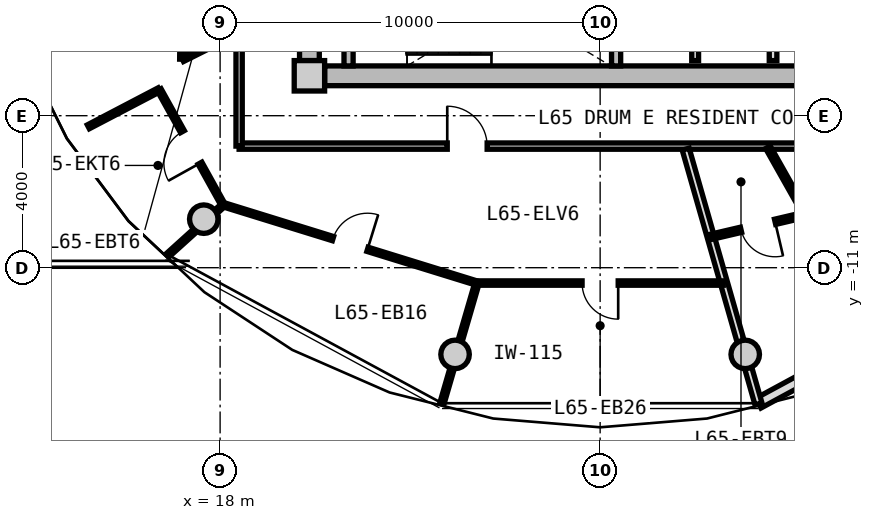
"""IFC4 building model, lengths in metres.
Left out: names, types, materials, properties, quantities, classifications, styles, units other than length and angle.
Written with IfcOpenShell. Run it as: python <this file> out.ifc"""

import sys

from ifc_helpers import new_model, si_unit, direction, frame, frame_2d, origin, origin_2d, place, context, subcontext, project, spatial, rectangle, circle, extrude, source, transform, mapped, element, fill, save


model = new_model("IFC4")
c1 = context("Model", 3, precision=1e-05, world=origin(), true_north=direction((0.0, 1.0)))
c2 = subcontext(c1, "Body", "Model", "MODEL_VIEW")
j1 = project(units=[si_unit("LENGTHUNIT", "METRE"), si_unit("PLANEANGLEUNIT", "RADIAN")], contexts=[c1])
p1 = place(None, origin())
s1 = spatial("IfcSite", under=j1, at=p1, CompositionType="ELEMENT")
p2 = place(p1, origin())
s2 = spatial("IfcBuilding", under=s1, at=p2, CompositionType="ELEMENT")
p3 = place(p2, frame((0.0, 0.0, 210.85)))
s3 = spatial("IfcBuildingStorey", under=s2, at=p3, CompositionType="ELEMENT", Elevation=210.85)
m1 = source(origin(), c2, "Body", "SweptSolid", [
    extrude(rectangle(XDim=0.8, YDim=0.8, at=origin_2d()), origin(), (0.0, 0.0, 1.0), 3.05),
])
p4 = place(p3, frame((20.35, -5.95, 0.0), z_axis=(0.0, 0.0, 1.0), x_axis=(1.0, 0.0, 0.0)))
e1 = element("IfcColumn", 1, at=p4, inside=s3, PredefinedType="COLUMN", context=c2, shape_type="MappedRepresentation", body=[
    mapped(m1, transform((0.0, 0.0, 0.0), x_axis=(1.0, 0.0, 0.0), y_axis=(0.0, 1.0, 0.0), z_axis=(0.0, 0.0, 1.0), scale=1.0)),
])
m2 = source(origin(), c2, "Body", "SweptSolid", [
    extrude(rectangle(XDim=14.5, YDim=0.52, at=frame_2d((7.25, 0.0))), origin(), (0.0, 0.0, 1.0), 2.76),
])
p5 = place(p3, frame((35.25, -5.95, 0.0), z_axis=(0.0, 0.0, 1.0), x_axis=(-1.0, 0.0, 0.0)))
e2 = element("IfcWall", 2, at=p5, inside=s3, PredefinedType="SHEAR", context=c2, shape_type="MappedRepresentation", body=[
    mapped(m2, transform((0.0, 0.0, 0.0), x_axis=(1.0, 0.0, 0.0), y_axis=(0.0, 1.0, 0.0), z_axis=(0.0, 0.0, 1.0), scale=1.0)),
])
m3 = source(origin(), c2, "Body", "SweptSolid", [
    extrude(rectangle(XDim=11.1, YDim=0.52, at=frame_2d((5.55, 0.0))), origin(), (0.0, 0.0, 1.0), 2.76),
])
p6 = place(p3, frame((20.35, -5.55, 0.0), z_axis=(0.0, 0.0, 1.0), x_axis=(0.0, 1.0, 0.0)))
e3 = element("IfcWall", 3, at=p6, inside=s3, PredefinedType="SHEAR", context=c2, shape_type="MappedRepresentation", body=[
    mapped(m3, transform((0.0, 0.0, 0.0), x_axis=(1.0, 0.0, 0.0), y_axis=(0.0, 1.0, 0.0), z_axis=(0.0, 0.0, 1.0), scale=1.0)),
])
p7 = place(p6, frame((3.8, 0.0, 0.0)))
e4 = element("IfcOpeningElement", 4, at=p7, cuts=e3, PredefinedType="OPENING", context=c2, shape_type="SweptSolid", body=[
    extrude(rectangle(XDim=1.2, YDim=2.15, at=frame_2d((0.6, 1.075))), frame((0.0, 0.27, 0.0), z_axis=(0.0, -1.0, 0.0), x_axis=(1.0, 0.0, 0.0)), (0.0, 0.0, 1.0), 0.54),
])
m4 = source(origin(), c2, "Body", "SweptSolid", [
    extrude(circle(Radius=0.375, at=origin_2d()), origin(), (0.0, 0.0, 1.0), 3.05),
])
for number, where, z_axis, x_axis in (
    (5, (17.57, -9.723, 0.0), (0.0, 0.0, 1.0), (1.0, 0.0, 0.0)),
    (6, (24.182, -13.281, 0.0), (0.0, 0.0, 1.0), (1.0, 0.0, 0.0)),
    (7, (31.818, -13.281, 0.0), (0.0, 0.0, 1.0), (1.0, 0.0, 0.0)),
):
    element("IfcColumn", number, at=place(p3, frame(where, z_axis=z_axis, x_axis=x_axis)), inside=s3, PredefinedType="COLUMN", context=c2, shape_type="MappedRepresentation", body=[
        mapped(m4, transform((0.0, 0.0, 0.0), x_axis=(1.0, 0.0, 0.0), y_axis=(0.0, 1.0, 0.0), z_axis=(0.0, 0.0, 1.0), scale=1.0)),
    ])
m5 = source(origin(), c2, "Body", "SweptSolid", [
    extrude(rectangle(XDim=8.197, YDim=0.29, at=frame_2d((4.099, 0.0))), origin(), (0.0, 0.0, 1.0), 2.76),
])
p8 = place(p3, frame((39.37, -10.663, 0.0), z_axis=(0.0, 0.0, 1.0), x_axis=(-0.879369910001, -0.476139224791, 0.0)))
e8 = element("IfcWall", 8, at=p8, inside=s3, PredefinedType="SOLIDWALL", context=c2, shape_type="MappedRepresentation", body=[
    mapped(m5, transform((0.0, 0.0, 0.0), x_axis=(1.0, 0.0, 0.0), y_axis=(0.0, 1.0, 0.0), z_axis=(0.0, 0.0, 1.0), scale=1.0)),
])
p9 = place(p8, frame((0.98, 0.0, 0.0)))
e9 = element("IfcOpeningElement", 9, at=p9, cuts=e8, PredefinedType="OPENING", context=c2, shape_type="SweptSolid", body=[
    extrude(rectangle(XDim=1.15, YDim=2.25, at=frame_2d((0.575, 1.125))), frame((0.0, 0.155, 0.0), z_axis=(0.0, -1.0, 0.0), x_axis=(1.0, 0.0, 0.0)), (0.0, 0.0, 1.0), 0.31),
])
p10 = place(p8, frame((4.629, 0.0, 0.85)))
e10 = element("IfcOpeningElement", 10, at=p10, cuts=e8, PredefinedType="OPENING", context=c2, shape_type="SweptSolid", body=[
    extrude(rectangle(XDim=1.2, YDim=1.5, at=frame_2d((0.6, 0.75))), frame((0.0, 0.155, 0.0), z_axis=(0.0, -1.0, 0.0), x_axis=(1.0, 0.0, 0.0)), (0.0, 0.0, 1.0), 0.31),
])
m6 = source(origin(), c2, "Body", "SweptSolid", [
    extrude(rectangle(XDim=3.24, YDim=0.24, at=frame_2d((1.62, 0.0))), origin(), (0.0, 0.0, 1.0), 2.76),
])
for number, where, z_axis, x_axis in (
    (11, (21.38, -5.69, 0.0), (0.0, 0.0, 1.0), (0.0, 1.0, 0.0)),
    (12, (28.42, -5.69, 0.0), (0.0, 0.0, 1.0), (0.0, 1.0, 0.0)),
):
    element("IfcWall", number, at=place(p3, frame(where, z_axis=z_axis, x_axis=x_axis)), inside=s3, PredefinedType="PARTITIONING", context=c2, shape_type="MappedRepresentation", body=[
        mapped(m6, transform((0.0, 0.0, 0.0), x_axis=(1.0, 0.0, 0.0), y_axis=(0.0, 1.0, 0.0), z_axis=(0.0, 0.0, 1.0), scale=1.0)),
    ])
m7 = source(origin(), c2, "Body", "SweptSolid", [
    extrude(rectangle(XDim=3.8, YDim=0.2, at=frame_2d((1.9, 0.0))), origin(), (0.0, 0.0, 1.0), 2.745),
])
p11 = place(p3, frame((32.55, -5.55, 0.0), z_axis=(0.0, 0.0, 1.0), x_axis=(0.0, 1.0, 0.0)))
e13 = element("IfcWall", 13, at=p11, inside=s3, PredefinedType="PARTITIONING", context=c2, shape_type="MappedRepresentation", body=[
    mapped(m7, transform((0.0, 0.0, 0.0), x_axis=(1.0, 0.0, 0.0), y_axis=(0.0, 1.0, 0.0), z_axis=(0.0, 0.0, 1.0), scale=1.0)),
])
m8 = source(origin(), c2, "Body", "SweptSolid", [
    extrude(rectangle(XDim=4.2, YDim=0.18, at=frame_2d((2.1, 0.0))), origin(), (0.0, 0.0, 1.0), 2.745),
])
p12 = place(p3, frame((30.5, -5.55, 0.0), z_axis=(0.0, 0.0, 1.0), x_axis=(0.0, 1.0, 0.0)))
e14 = element("IfcWall", 14, at=p12, inside=s3, PredefinedType="PARTITIONING", context=c2, shape_type="MappedRepresentation", body=[
    mapped(m8, transform((0.0, 0.0, 0.0), x_axis=(1.0, 0.0, 0.0), y_axis=(0.0, 1.0, 0.0), z_axis=(0.0, 0.0, 1.0), scale=1.0)),
])
m9 = source(origin(), c2, "Body", "SweptSolid", [
    extrude(rectangle(XDim=19.0, YDim=0.165, at=frame_2d((9.5, 0.0))), origin(), (0.0, 0.0, 1.0), 2.745),
])
p13 = place(p3, frame((37.5, -7.8, 0.0), z_axis=(0.0, 0.0, 1.0), x_axis=(-1.0, 0.0, 0.0)))
e15 = element("IfcWall", 15, at=p13, inside=s3, PredefinedType="PARTITIONING", context=c2, shape_type="MappedRepresentation", body=[
    mapped(m9, transform((0.0, 0.0, 0.0), x_axis=(1.0, 0.0, 0.0), y_axis=(0.0, 1.0, 0.0), z_axis=(0.0, 0.0, 1.0), scale=1.0)),
])
p14 = place(p13, frame((12.473, 0.0, 0.0)))
e16 = element("IfcOpeningElement", 16, at=p14, cuts=e15, PredefinedType="OPENING", context=c2, shape_type="SweptSolid", body=[
    extrude(rectangle(XDim=1.05, YDim=2.15, at=frame_2d((0.525, 1.075))), frame((0.0, 0.093, 0.0), z_axis=(0.0, -1.0, 0.0), x_axis=(1.0, 0.0, 0.0)), (0.0, 0.0, 1.0), 0.185),
])
m10 = source(origin(), c2, "Body", "SweptSolid", [
    extrude(rectangle(XDim=6.88, YDim=0.165, at=frame_2d((3.44, 0.0))), origin(), (0.0, 0.0, 1.0), 2.745),
])
p15 = place(p3, frame((18.5, -7.8, 0.0), z_axis=(0.0, 0.0, 1.0), x_axis=(0.0, 1.0, 0.0)))
e17 = element("IfcWall", 17, at=p15, inside=s3, PredefinedType="PARTITIONING", context=c2, shape_type="MappedRepresentation", body=[
    mapped(m10, transform((0.0, 0.0, 0.0), x_axis=(1.0, 0.0, 0.0), y_axis=(0.0, 1.0, 0.0), z_axis=(0.0, 0.0, 1.0), scale=1.0)),
])
m11 = source(origin(), c2, "Body", "SweptSolid", [
    extrude(rectangle(XDim=6.974, YDim=0.19, at=frame_2d((3.487, 0.0))), origin(), (0.0, 0.0, 1.0), 2.345),
])
p16 = place(p3, frame((30.251, -7.88, 0.0), z_axis=(0.0, 0.0, 1.0), x_axis=(0.274707256801, -0.961527910703, 0.0)))
e18 = element("IfcWall", 18, at=p16, inside=s3, PredefinedType="PARTITIONING", context=c2, shape_type="MappedRepresentation", body=[
    mapped(m11, transform((0.0, 0.0, 0.0), x_axis=(1.0, 0.0, 0.0), y_axis=(0.0, 1.0, 0.0), z_axis=(0.0, 0.0, 1.0), scale=1.0)),
])
m12 = source(origin(), c2, "Body", "SweptSolid", [
    extrude(rectangle(XDim=6.98, YDim=0.115, at=frame_2d((3.49, 0.0))), origin(), (0.0, 0.0, 1.0), 2.745),
])
p17 = place(p3, frame((18.091, -9.344, 0.0), z_axis=(0.0, 0.0, 1.0), x_axis=(0.955342331637, -0.295501318749, 0.0)))
e19 = element("IfcWall", 19, at=p17, inside=s3, PredefinedType="PARTITIONING", context=c2, shape_type="MappedRepresentation", body=[
    mapped(m12, transform((0.0, 0.0, 0.0), x_axis=(1.0, 0.0, 0.0), y_axis=(0.0, 1.0, 0.0), z_axis=(0.0, 0.0, 1.0), scale=1.0)),
])
p18 = place(p17, frame((3.015, 0.0, 0.0)))
e20 = element("IfcOpeningElement", 20, at=p18, cuts=e19, PredefinedType="OPENING", context=c2, shape_type="SweptSolid", body=[
    extrude(rectangle(XDim=0.95, YDim=2.1, at=frame_2d((0.475, 1.05))), frame((0.0, 0.067, 0.0), z_axis=(0.0, -1.0, 0.0), x_axis=(1.0, 0.0, 0.0)), (0.0, 0.0, 1.0), 0.135),
])
m13 = source(origin(), c2, "Body", "SweptSolid", [
    extrude(rectangle(XDim=1.988, YDim=0.115, at=frame_2d((0.994, 0.0))), origin(), (0.0, 0.0, 1.0), 2.345),
])
p19 = place(p3, frame((18.091, -9.344, 0.0), z_axis=(0.0, 0.0, 1.0), x_axis=(-0.741992301729, -0.670408401033, 0.0)))
e21 = element("IfcWall", 21, at=p19, inside=s3, PredefinedType="PARTITIONING", context=c2, shape_type="MappedRepresentation", body=[
    mapped(m13, transform((0.0, 0.0, 0.0), x_axis=(1.0, 0.0, 0.0), y_axis=(0.0, 1.0, 0.0), z_axis=(0.0, 0.0, 1.0), scale=1.0)),
])
m14 = source(origin(), c2, "Body", "SweptSolid", [
    extrude(rectangle(XDim=6.481, YDim=0.115, at=frame_2d((3.24, 0.0))), origin(), (0.0, 0.0, 1.0), 2.745),
])
p20 = place(p3, frame((24.76, -11.404, 0.0), z_axis=(0.0, 0.0, 1.0), x_axis=(1.0, 0.0, 0.0)))
e22 = element("IfcWall", 22, at=p20, inside=s3, PredefinedType="PARTITIONING", context=c2, shape_type="MappedRepresentation", body=[
    mapped(m14, transform((0.0, 0.0, 0.0), x_axis=(1.0, 0.0, 0.0), y_axis=(0.0, 1.0, 0.0), z_axis=(0.0, 0.0, 1.0), scale=1.0)),
])
p21 = place(p20, frame((2.765, 0.0, 0.0)))
e23 = element("IfcOpeningElement", 23, at=p21, cuts=e22, PredefinedType="OPENING", context=c2, shape_type="SweptSolid", body=[
    extrude(rectangle(XDim=0.95, YDim=2.1, at=frame_2d((0.475, 1.05))), frame((0.0, 0.067, 0.0), z_axis=(0.0, -1.0, 0.0), x_axis=(1.0, 0.0, 0.0)), (0.0, 0.0, 1.0), 0.135),
])
m15 = source(origin(), c2, "Body", "SweptSolid", [
    extrude(rectangle(XDim=3.313, YDim=0.115, at=frame_2d((1.657, 0.0))), origin(), (0.0, 0.0, 1.0), 2.345),
])
p22 = place(p3, frame((24.76, -11.404, 0.0), z_axis=(0.0, 0.0, 1.0), x_axis=(-0.279612365916, -0.960112975033, 0.0)))
e24 = element("IfcWall", 24, at=p22, inside=s3, PredefinedType="PARTITIONING", context=c2, shape_type="MappedRepresentation", body=[
    mapped(m15, transform((0.0, 0.0, 0.0), x_axis=(1.0, 0.0, 0.0), y_axis=(0.0, 1.0, 0.0), z_axis=(0.0, 0.0, 1.0), scale=1.0)),
])
m16 = source(origin(), c2, "Body", "SweptSolid", [
    extrude(rectangle(XDim=1.638, YDim=0.14, at=frame_2d((0.819, 0.0))), origin(), (0.0, 0.0, 1.0), 2.745),
])
p23 = place(p3, frame((18.47, -4.778, 0.0), z_axis=(0.0, 0.0, 1.0), x_axis=(-0.893919977945, -0.448226586707, 0.0)))
e25 = element("IfcWall", 25, at=p23, inside=s3, PredefinedType="PARTITIONING", context=c2, shape_type="MappedRepresentation", body=[
    mapped(m16, transform((0.0, 0.0, 0.0), x_axis=(1.0, 0.0, 0.0), y_axis=(0.0, 1.0, 0.0), z_axis=(0.0, 0.0, 1.0), scale=1.0)),
])
m17 = source(origin(), c2, "Body", "SweptSolid", [
    extrude(rectangle(XDim=2.759, YDim=0.14, at=frame_2d((1.379, 0.0))), origin(), (0.0, 0.0, 1.0), 2.745),
])
p24 = place(p3, frame((17.005, -5.513, 0.0), z_axis=(0.0, 0.0, 1.0), x_axis=(0.01194710728, 0.999928630767, 0.0)))
e26 = element("IfcWall", 26, at=p24, inside=s3, PredefinedType="PARTITIONING", context=c2, shape_type="MappedRepresentation", body=[
    mapped(m17, transform((0.0, 0.0, 0.0), x_axis=(1.0, 0.0, 0.0), y_axis=(0.0, 1.0, 0.0), z_axis=(0.0, 0.0, 1.0), scale=1.0)),
])
p25 = place(p24, frame((0.919, 0.0, 0.0)))
e27 = element("IfcOpeningElement", 27, at=p25, cuts=e26, PredefinedType="OPENING", context=c2, shape_type="SweptSolid", body=[
    extrude(rectangle(XDim=0.92, YDim=2.1, at=frame_2d((0.46, 1.05))), frame((0.0, 0.08, 0.0), z_axis=(0.0, -1.0, 0.0), x_axis=(1.0, 0.0, 0.0)), (0.0, 0.0, 1.0), 0.16),
])
m18 = source(origin(), c2, "Body", "SweptSolid", [
    extrude(rectangle(XDim=2.104, YDim=0.115, at=frame_2d((1.052, 0.0))), origin(), (0.0, 0.0, 1.0), 2.745),
])
p26 = place(p3, frame((16.396, -6.317, 0.0), z_axis=(0.0, 0.0, 1.0), x_axis=(-0.886060817493, -0.463569010724, 0.0)))
e28 = element("IfcWall", 28, at=p26, inside=s3, PredefinedType="PARTITIONING", context=c2, shape_type="MappedRepresentation", body=[
    mapped(m18, transform((0.0, 0.0, 0.0), x_axis=(1.0, 0.0, 0.0), y_axis=(0.0, 1.0, 0.0), z_axis=(0.0, 0.0, 1.0), scale=1.0)),
])
m19 = source(origin(), c2, "Body", "SweptSolid", [
    extrude(rectangle(XDim=3.472, YDim=0.115, at=frame_2d((1.736, 0.0))), origin(), (0.0, 0.0, 1.0), 2.745),
])
p27 = place(p3, frame((16.396, -6.317, 0.0), z_axis=(0.0, 0.0, 1.0), x_axis=(0.485804139346, -0.874067696574, 0.0)))
e29 = element("IfcWall", 29, at=p27, inside=s3, PredefinedType="PARTITIONING", context=c2, shape_type="MappedRepresentation", body=[
    mapped(m19, transform((0.0, 0.0, 0.0), x_axis=(1.0, 0.0, 0.0), y_axis=(0.0, 1.0, 0.0), z_axis=(0.0, 0.0, 1.0), scale=1.0)),
])
p28 = place(p27, frame((1.261, 0.0, 0.0)))
e30 = element("IfcOpeningElement", 30, at=p28, cuts=e29, PredefinedType="OPENING", context=c2, shape_type="SweptSolid", body=[
    extrude(rectangle(XDim=0.95, YDim=2.1, at=frame_2d((0.475, 1.05))), frame((0.0, 0.067, 0.0), z_axis=(0.0, -1.0, 0.0), x_axis=(1.0, 0.0, 0.0)), (0.0, 0.0, 1.0), 0.135),
])
m20 = source(origin(), c2, "Body", "SweptSolid", [
    extrude(rectangle(XDim=2.035, YDim=0.14, at=frame_2d((1.018, 0.0))), origin(), (0.0, 0.0, 1.0), 2.745),
])
p29 = place(p3, frame((32.415, -7.83, 0.0), z_axis=(0.0, 0.0, 1.0), x_axis=(0.491092509169, -0.871107425888, 0.0)))
e31 = element("IfcWall", 31, at=p29, inside=s3, PredefinedType="PARTITIONING", context=c2, shape_type="MappedRepresentation", body=[
    mapped(m20, transform((0.0, 0.0, 0.0), x_axis=(1.0, 0.0, 0.0), y_axis=(0.0, 1.0, 0.0), z_axis=(0.0, 0.0, 1.0), scale=1.0)),
])
m21 = source(origin(), c2, "Body", "SweptSolid", [
    extrude(rectangle(XDim=2.586, YDim=0.14, at=frame_2d((1.293, 0.0))), origin(), (0.0, 0.0, 1.0), 2.745),
])
p30 = place(p3, frame((33.415, -9.603, 0.0), z_axis=(0.0, 0.0, 1.0), x_axis=(-0.973691298219, -0.227871138526, 0.0)))
e32 = element("IfcWall", 32, at=p30, inside=s3, PredefinedType="PARTITIONING", context=c2, shape_type="MappedRepresentation", body=[
    mapped(m21, transform((0.0, 0.0, 0.0), x_axis=(1.0, 0.0, 0.0), y_axis=(0.0, 1.0, 0.0), z_axis=(0.0, 0.0, 1.0), scale=1.0)),
])
p31 = place(p30, frame((0.833, 0.0, 0.0)))
e33 = element("IfcOpeningElement", 33, at=p31, cuts=e32, PredefinedType="OPENING", context=c2, shape_type="SweptSolid", body=[
    extrude(rectangle(XDim=0.92, YDim=2.1, at=frame_2d((0.46, 1.05))), frame((0.0, 0.08, 0.0), z_axis=(0.0, -1.0, 0.0), x_axis=(1.0, 0.0, 0.0)), (0.0, 0.0, 1.0), 0.16),
])
m22 = source(origin(), c2, "Body", "SweptSolid", [
    extrude(rectangle(XDim=1.05, YDim=2.15, at=frame_2d((0.525, 1.075))), frame((0.0, 0.025, 0.0), z_axis=(0.0, -1.0, 0.0), x_axis=(1.0, 0.0, 0.0)), (0.0, 0.0, 1.0), 0.05),
])
p32 = place(p14, frame((1.05, 0.0, 0.0), z_axis=(0.0, 0.0, 1.0), x_axis=(-1.0, 0.0, 0.0)))
e34 = element("IfcDoor", 34, at=p32, inside=s3, OperationType="SINGLE_SWING_LEFT", PredefinedType="DOOR", context=c2, shape_type="MappedRepresentation", body=[
    mapped(m22, transform((0.0, 0.0, 0.0), x_axis=(1.0, 0.0, 0.0), y_axis=(0.0, 1.0, 0.0), z_axis=(0.0, 0.0, 1.0), scale=1.0)),
])
fill(e16, e34)
m23 = source(origin(), c2, "Body", "SweptSolid", [
    extrude(rectangle(XDim=0.95, YDim=2.1, at=frame_2d((0.475, 1.05))), frame((0.0, 0.025, 0.0), z_axis=(0.0, -1.0, 0.0), x_axis=(1.0, 0.0, 0.0)), (0.0, 0.0, 1.0), 0.05),
])
p33 = place(p28, frame((0.95, 0.0, 0.0), z_axis=(0.0, 0.0, 1.0), x_axis=(-1.0, 0.0, 0.0)))
e35 = element("IfcDoor", 35, at=p33, inside=s3, OperationType="SINGLE_SWING_LEFT", PredefinedType="DOOR", context=c2, shape_type="MappedRepresentation", body=[
    mapped(m23, transform((0.0, 0.0, 0.0), x_axis=(1.0, 0.0, 0.0), y_axis=(0.0, 1.0, 0.0), z_axis=(0.0, 0.0, 1.0), scale=1.0)),
])
fill(e30, e35)
p34 = place(p18, origin())
e36 = element("IfcDoor", 36, at=p34, inside=s3, OperationType="SINGLE_SWING_RIGHT", PredefinedType="DOOR", context=c2, shape_type="MappedRepresentation", body=[
    mapped(m23, transform((0.0, 0.0, 0.0), x_axis=(1.0, 0.0, 0.0), y_axis=(0.0, 1.0, 0.0), z_axis=(0.0, 0.0, 1.0), scale=1.0)),
])
fill(e20, e36)
p35 = place(p21, frame((0.95, 0.0, 0.0), z_axis=(0.0, 0.0, 1.0), x_axis=(-1.0, 0.0, 0.0)))
e37 = element("IfcDoor", 37, at=p35, inside=s3, OperationType="SINGLE_SWING_LEFT", PredefinedType="DOOR", context=c2, shape_type="MappedRepresentation", body=[
    mapped(m23, transform((0.0, 0.0, 0.0), x_axis=(1.0, 0.0, 0.0), y_axis=(0.0, 1.0, 0.0), z_axis=(0.0, 0.0, 1.0), scale=1.0)),
])
fill(e23, e37)
m24 = source(origin(), c2, "Body", "SweptSolid", [
    extrude(rectangle(XDim=0.92, YDim=2.1, at=frame_2d((0.46, 1.05))), frame((0.0, 0.025, 0.0), z_axis=(0.0, -1.0, 0.0), x_axis=(1.0, 0.0, 0.0)), (0.0, 0.0, 1.0), 0.05),
])
p36 = place(p31, origin())
e38 = element("IfcDoor", 38, at=p36, inside=s3, OperationType="SINGLE_SWING_LEFT", PredefinedType="DOOR", context=c2, shape_type="MappedRepresentation", body=[
    mapped(m24, transform((0.0, 0.0, 0.0), x_axis=(1.0, 0.0, 0.0), y_axis=(0.0, 1.0, 0.0), z_axis=(0.0, 0.0, 1.0), scale=1.0)),
])
fill(e33, e38)
save(model, sys.argv[1])
